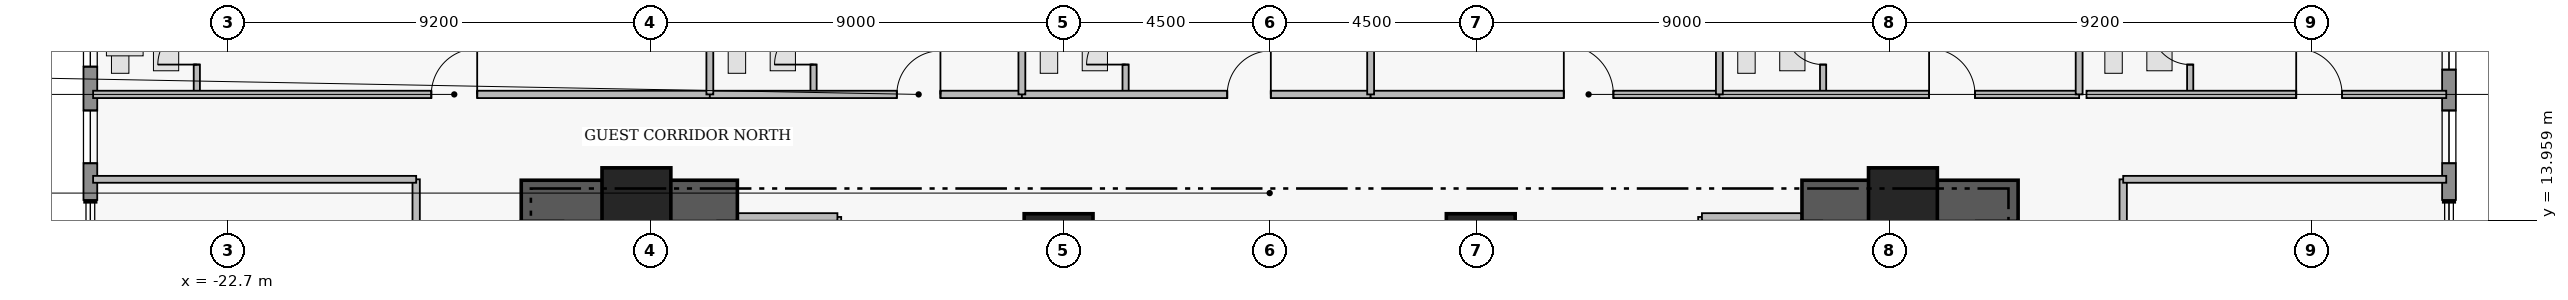
"""IFC4 building model, lengths in metres.
Left out: names, types, materials, properties, quantities, classifications, styles, units other than length and angle.
Written with IfcOpenShell. Run it as: python <this file> out.ifc"""

import sys

from ifc_helpers import new_model, si_unit, direction, frame, frame_2d, origin, origin_2d, place, context, subcontext, project, spatial, rectangle, extrude, element, fill, save


model = new_model("IFC4")
c1 = context("Model", 3, precision=1e-05, world=origin(), true_north=direction((0.0, 1.0)))
c2 = subcontext(c1, "Body", "Model", "MODEL_VIEW")
j1 = project(units=[si_unit("LENGTHUNIT", "METRE"), si_unit("PLANEANGLEUNIT", "RADIAN")], contexts=[c1])
p1 = place(None, origin())
s1 = spatial("IfcSite", under=j1, at=p1, CompositionType="ELEMENT")
p2 = place(p1, origin())
s2 = spatial("IfcBuilding", under=s1, at=p2, CompositionType="ELEMENT")
p3 = place(p2, frame((0.0, 0.0, 49.5)))
s3 = spatial("IfcBuildingStorey", under=s2, at=p3, CompositionType="ELEMENT", Elevation=49.5)
for number, where, z_axis, x_axis in (
    (1, (-16.31, 14.38, 0.0), (0.0, 0.0, 1.0), (1.0, 0.0, 0.0)),
    (2, (11.6, 14.38, 0.0), (0.0, 0.0, 1.0), (1.0, 0.0, 0.0)),
):
    element("IfcWall", number, at=place(p3, frame(where, z_axis=z_axis, x_axis=x_axis)), inside=s3, PredefinedType="SHEAR", context=c2, shape_type="SweptSolid", body=[
        extrude(rectangle(XDim=4.71, YDim=0.9, at=frame_2d((2.355, 0.0))), origin(), (0.0, 0.0, 1.0), 3.46),
    ])
for number, where, z_axis, x_axis in (
    (3, (-13.8, 14.35, 0.0), (0.0, 0.0, 1.0), (1.0, 0.0, 0.0)),
    (4, (-4.6, 13.35, 0.0), (0.0, 0.0, 1.0), (1.0, 0.0, 0.0)),
    (5, (4.6, 13.35, 0.0), (0.0, 0.0, 1.0), (1.0, 0.0, 0.0)),
    (6, (13.8, 14.35, 0.0), (0.0, 0.0, 1.0), (1.0, 0.0, 0.0)),
):
    element("IfcColumn", number, at=place(p3, frame(where, z_axis=z_axis, x_axis=x_axis)), inside=s3, PredefinedType="COLUMN", context=c2, shape_type="SweptSolid", body=[
        extrude(rectangle(XDim=1.5, YDim=1.5, at=origin_2d()), origin(), (0.0, 0.0, 1.0), 3.65),
    ])
p4 = place(p3, frame((-25.7, 14.4, 0.0), z_axis=(0.0, 0.0, 1.0), x_axis=(0.0, 1.0, 0.0)))
e7 = element("IfcWall", 7, at=p4, inside=s3, PredefinedType="STANDARD", context=c2, shape_type="SweptSolid", body=[
    extrude(rectangle(XDim=5.1, YDim=0.3, at=frame_2d((2.55, 0.0))), origin(), (0.0, 0.0, 1.0), 3.43),
])
p5 = place(p4, frame((0.8, 0.0, 0.95)))
e8 = element("IfcOpeningElement", 8, at=p5, cuts=e7, PredefinedType="OPENING", context=c2, shape_type="SweptSolid", body=[
    extrude(rectangle(XDim=1.15, YDim=1.55, at=frame_2d((0.575, 0.775))), frame((0.0, 0.16, 0.0), z_axis=(0.0, -1.0, 0.0), x_axis=(1.0, 0.0, 0.0)), (0.0, 0.0, 1.0), 0.32),
])
p6 = place(p4, frame((2.905, 0.0, 0.95)))
e9 = element("IfcOpeningElement", 9, at=p6, cuts=e7, PredefinedType="OPENING", context=c2, shape_type="SweptSolid", body=[
    extrude(rectangle(XDim=1.15, YDim=1.55, at=frame_2d((0.575, 0.775))), frame((0.0, 0.16, 0.0), z_axis=(0.0, -1.0, 0.0), x_axis=(1.0, 0.0, 0.0)), (0.0, 0.0, 1.0), 0.32),
])
p7 = place(p3, frame((25.7, 19.5, 0.0), z_axis=(0.0, 0.0, 1.0), x_axis=(0.0, -1.0, 0.0)))
e10 = element("IfcWall", 10, at=p7, inside=s3, PredefinedType="STANDARD", context=c2, shape_type="SweptSolid", body=[
    extrude(rectangle(XDim=5.1, YDim=0.3, at=frame_2d((2.55, 0.0))), origin(), (0.0, 0.0, 1.0), 3.43),
])
p8 = place(p7, frame((0.66, 0.0, 0.85)))
e11 = element("IfcOpeningElement", 11, at=p8, cuts=e10, PredefinedType="OPENING", context=c2, shape_type="SweptSolid", body=[
    extrude(rectangle(XDim=1.6, YDim=1.8, at=frame_2d((0.8, 0.9))), frame((0.0, 0.16, 0.0), z_axis=(0.0, -1.0, 0.0), x_axis=(1.0, 0.0, 0.0)), (0.0, 0.0, 1.0), 0.32),
])
p9 = place(p7, frame((3.15, 0.0, 0.95)))
e12 = element("IfcOpeningElement", 12, at=p9, cuts=e10, PredefinedType="OPENING", context=c2, shape_type="SweptSolid", body=[
    extrude(rectangle(XDim=1.15, YDim=1.55, at=frame_2d((0.575, 0.775))), frame((0.0, 0.16, 0.0), z_axis=(0.0, -1.0, 0.0), x_axis=(1.0, 0.0, 0.0)), (0.0, 0.0, 1.0), 0.32),
])
p10 = place(p3, frame((-23.38, 16.7, 0.0), z_axis=(0.0, 0.0, 1.0), x_axis=(0.0, 1.0, 0.0)))
e13 = element("IfcWall", 13, at=p10, inside=s3, PredefinedType="PLUMBINGWALL", context=c2, shape_type="SweptSolid", body=[
    extrude(rectangle(XDim=2.36, YDim=0.135, at=frame_2d((1.18, 0.0))), origin(), (0.0, 0.0, 1.0), 3.43),
])
p11 = place(p10, frame((0.65, 0.0, 0.0)))
e14 = element("IfcOpeningElement", 14, at=p11, cuts=e13, PredefinedType="OPENING", context=c2, shape_type="SweptSolid", body=[
    extrude(rectangle(XDim=0.85, YDim=2.1, at=frame_2d((0.425, 1.05))), frame((0.0, 0.077, 0.0), z_axis=(0.0, -1.0, 0.0), x_axis=(1.0, 0.0, 0.0)), (0.0, 0.0, 1.0), 0.155),
])
p12 = place(p3, frame((-25.64, 16.7, 0.0), z_axis=(0.0, 0.0, 1.0), x_axis=(1.0, 0.0, 0.0)))
e15 = element("IfcWall", 15, at=p12, inside=s3, PredefinedType="PARTITIONING", context=c2, shape_type="SweptSolid", body=[
    extrude(rectangle(XDim=13.44, YDim=0.16, at=frame_2d((6.72, 0.0))), origin(), (0.0, 0.0, 1.0), 2.973),
])
p13 = place(p12, frame((7.37, 0.0, 0.0)))
e16 = element("IfcOpeningElement", 16, at=p13, cuts=e15, PredefinedType="OPENING", context=c2, shape_type="SweptSolid", body=[
    extrude(rectangle(XDim=1.0, YDim=2.15, at=frame_2d((0.5, 1.075))), frame((0.0, 0.09, 0.0), z_axis=(0.0, -1.0, 0.0), x_axis=(1.0, 0.0, 0.0)), (0.0, 0.0, 1.0), 0.18),
])
p14 = place(p3, frame((-9.94, 16.7, 0.0), z_axis=(0.0, 0.0, 1.0), x_axis=(0.0, 1.0, 0.0)))
e17 = element("IfcWall", 17, at=p14, inside=s3, PredefinedType="PLUMBINGWALL", context=c2, shape_type="SweptSolid", body=[
    extrude(rectangle(XDim=2.36, YDim=0.135, at=frame_2d((1.18, 0.0))), origin(), (0.0, 0.0, 1.0), 3.43),
])
p15 = place(p14, frame((0.65, 0.0, 0.0)))
e18 = element("IfcOpeningElement", 18, at=p15, cuts=e17, PredefinedType="OPENING", context=c2, shape_type="SweptSolid", body=[
    extrude(rectangle(XDim=0.85, YDim=2.1, at=frame_2d((0.425, 1.05))), frame((0.0, 0.077, 0.0), z_axis=(0.0, -1.0, 0.0), x_axis=(1.0, 0.0, 0.0)), (0.0, 0.0, 1.0), 0.155),
])
p16 = place(p3, frame((-12.2, 16.7, 0.0), z_axis=(0.0, 0.0, 1.0), x_axis=(1.0, 0.0, 0.0)))
e19 = element("IfcWall", 19, at=p16, inside=s3, PredefinedType="PARTITIONING", context=c2, shape_type="SweptSolid", body=[
    extrude(rectangle(XDim=6.8, YDim=0.16, at=frame_2d((3.4, 0.0))), origin(), (0.0, 0.0, 1.0), 2.973),
])
p17 = place(p16, frame((4.075, 0.0, 0.0)))
e20 = element("IfcOpeningElement", 20, at=p17, cuts=e19, PredefinedType="OPENING", context=c2, shape_type="SweptSolid", body=[
    extrude(rectangle(XDim=0.95, YDim=2.15, at=frame_2d((0.475, 1.075))), frame((0.0, 0.09, 0.0), z_axis=(0.0, -1.0, 0.0), x_axis=(1.0, 0.0, 0.0)), (0.0, 0.0, 1.0), 0.18),
])
p18 = place(p3, frame((-3.14, 16.7, 0.0), z_axis=(0.0, 0.0, 1.0), x_axis=(0.0, 1.0, 0.0)))
e21 = element("IfcWall", 21, at=p18, inside=s3, PredefinedType="PLUMBINGWALL", context=c2, shape_type="SweptSolid", body=[
    extrude(rectangle(XDim=2.36, YDim=0.135, at=frame_2d((1.18, 0.0))), origin(), (0.0, 0.0, 1.0), 3.43),
])
p19 = place(p18, frame((0.65, 0.0, 0.0)))
e22 = element("IfcOpeningElement", 22, at=p19, cuts=e21, PredefinedType="OPENING", context=c2, shape_type="SweptSolid", body=[
    extrude(rectangle(XDim=0.85, YDim=2.1, at=frame_2d((0.425, 1.05))), frame((0.0, 0.077, 0.0), z_axis=(0.0, -1.0, 0.0), x_axis=(1.0, 0.0, 0.0)), (0.0, 0.0, 1.0), 0.155),
])
p20 = place(p3, frame((-5.4, 16.7, 0.0), z_axis=(0.0, 0.0, 1.0), x_axis=(1.0, 0.0, 0.0)))
e23 = element("IfcWall", 23, at=p20, inside=s3, PredefinedType="PARTITIONING", context=c2, shape_type="SweptSolid", body=[
    extrude(rectangle(XDim=7.6, YDim=0.16, at=frame_2d((3.8, 0.0))), origin(), (0.0, 0.0, 1.0), 2.973),
])
p21 = place(p20, frame((4.475, 0.0, 0.0)))
e24 = element("IfcOpeningElement", 24, at=p21, cuts=e23, PredefinedType="OPENING", context=c2, shape_type="SweptSolid", body=[
    extrude(rectangle(XDim=0.95, YDim=2.15, at=frame_2d((0.475, 1.075))), frame((0.0, 0.09, 0.0), z_axis=(0.0, -1.0, 0.0), x_axis=(1.0, 0.0, 0.0)), (0.0, 0.0, 1.0), 0.18),
])
p22 = place(p3, frame((2.2, 16.7, 0.0), z_axis=(0.0, 0.0, 1.0), x_axis=(1.0, 0.0, 0.0)))
e25 = element("IfcWall", 25, at=p22, inside=s3, PredefinedType="PARTITIONING", context=c2, shape_type="SweptSolid", body=[
    extrude(rectangle(XDim=7.6, YDim=0.16, at=frame_2d((3.8, 0.0))), origin(), (0.0, 0.0, 1.0), 2.973),
])
p23 = place(p22, frame((4.21, 0.0, 0.0)))
e26 = element("IfcOpeningElement", 26, at=p23, cuts=e25, PredefinedType="OPENING", context=c2, shape_type="SweptSolid", body=[
    extrude(rectangle(XDim=1.08, YDim=2.18, at=frame_2d((0.54, 1.09))), frame((0.0, 0.09, 0.0), z_axis=(0.0, -1.0, 0.0), x_axis=(1.0, 0.0, 0.0)), (0.0, 0.0, 1.0), 0.18),
])
p24 = place(p3, frame((12.06, 16.7, 0.0), z_axis=(0.0, 0.0, 1.0), x_axis=(0.0, 1.0, 0.0)))
e27 = element("IfcWall", 27, at=p24, inside=s3, PredefinedType="PLUMBINGWALL", context=c2, shape_type="SweptSolid", body=[
    extrude(rectangle(XDim=2.36, YDim=0.135, at=frame_2d((1.18, 0.0))), origin(), (0.0, 0.0, 1.0), 3.43),
])
p25 = place(p24, frame((0.65, 0.0, 0.0)))
e28 = element("IfcOpeningElement", 28, at=p25, cuts=e27, PredefinedType="OPENING", context=c2, shape_type="SweptSolid", body=[
    extrude(rectangle(XDim=0.85, YDim=2.1, at=frame_2d((0.425, 1.05))), frame((0.0, 0.077, 0.0), z_axis=(0.0, -1.0, 0.0), x_axis=(1.0, 0.0, 0.0)), (0.0, 0.0, 1.0), 0.155),
])
p26 = place(p3, frame((9.8, 16.7, 0.0), z_axis=(0.0, 0.0, 1.0), x_axis=(1.0, 0.0, 0.0)))
e29 = element("IfcWall", 29, at=p26, inside=s3, PredefinedType="PARTITIONING", context=c2, shape_type="SweptSolid", body=[
    extrude(rectangle(XDim=7.84, YDim=0.16, at=frame_2d((3.92, 0.0))), origin(), (0.0, 0.0, 1.0), 2.973),
])
p27 = place(p26, frame((4.57, 0.0, 0.0)))
e30 = element("IfcOpeningElement", 30, at=p27, cuts=e29, PredefinedType="OPENING", context=c2, shape_type="SweptSolid", body=[
    extrude(rectangle(XDim=1.0, YDim=2.15, at=frame_2d((0.5, 1.075))), frame((0.0, 0.09, 0.0), z_axis=(0.0, -1.0, 0.0), x_axis=(1.0, 0.0, 0.0)), (0.0, 0.0, 1.0), 0.18),
])
p28 = place(p3, frame((20.06, 16.7, 0.0), z_axis=(0.0, 0.0, 1.0), x_axis=(0.0, 1.0, 0.0)))
e31 = element("IfcWall", 31, at=p28, inside=s3, PredefinedType="PLUMBINGWALL", context=c2, shape_type="SweptSolid", body=[
    extrude(rectangle(XDim=2.36, YDim=0.135, at=frame_2d((1.18, 0.0))), origin(), (0.0, 0.0, 1.0), 3.43),
])
p29 = place(p28, frame((0.65, 0.0, 0.0)))
e32 = element("IfcOpeningElement", 32, at=p29, cuts=e31, PredefinedType="OPENING", context=c2, shape_type="SweptSolid", body=[
    extrude(rectangle(XDim=0.85, YDim=2.1, at=frame_2d((0.425, 1.05))), frame((0.0, 0.077, 0.0), z_axis=(0.0, -1.0, 0.0), x_axis=(1.0, 0.0, 0.0)), (0.0, 0.0, 1.0), 0.155),
])
p30 = place(p3, frame((17.8, 16.7, 0.0), z_axis=(0.0, 0.0, 1.0), x_axis=(1.0, 0.0, 0.0)))
e33 = element("IfcWall", 33, at=p30, inside=s3, PredefinedType="PARTITIONING", context=c2, shape_type="SweptSolid", body=[
    extrude(rectangle(XDim=7.84, YDim=0.16, at=frame_2d((3.92, 0.0))), origin(), (0.0, 0.0, 1.0), 3.43),
])
p31 = place(p30, frame((4.57, 0.0, 0.0)))
e34 = element("IfcOpeningElement", 34, at=p31, cuts=e33, PredefinedType="OPENING", context=c2, shape_type="SweptSolid", body=[
    extrude(rectangle(XDim=1.0, YDim=2.15, at=frame_2d((0.5, 1.075))), frame((0.0, 0.09, 0.0), z_axis=(0.0, -1.0, 0.0), x_axis=(1.0, 0.0, 0.0)), (0.0, 0.0, 1.0), 0.18),
])
p32 = place(p3, frame((18.6, 7.96, 0.0), z_axis=(0.0, 0.0, 1.0), x_axis=(0.0, 1.0, 0.0)))
e35 = element("IfcWall", 35, at=p32, inside=s3, PredefinedType="PARTITIONING", context=c2, shape_type="SweptSolid", body=[
    extrude(rectangle(XDim=6.89, YDim=0.16, at=frame_2d((3.445, 0.0))), origin(), (0.0, 0.0, 1.0), 3.43),
])
p33 = place(p32, frame((2.985, 0.0, 0.0)))
e36 = element("IfcOpeningElement", 36, at=p33, cuts=e35, PredefinedType="OPENING", context=c2, shape_type="SweptSolid", body=[
    extrude(rectangle(XDim=0.92, YDim=2.12, at=frame_2d((0.46, 1.06))), frame((0.0, 0.09, 0.0), z_axis=(0.0, -1.0, 0.0), x_axis=(1.0, 0.0, 0.0)), (0.0, 0.0, 1.0), 0.18),
])
p34 = place(p3, frame((-18.6, 1.55, 0.0), z_axis=(0.0, 0.0, 1.0), x_axis=(0.0, 1.0, 0.0)))
e37 = element("IfcWall", 37, at=p34, inside=s3, PredefinedType="PARTITIONING", context=c2, shape_type="SweptSolid", body=[
    extrude(rectangle(XDim=13.3, YDim=0.16, at=frame_2d((6.65, 0.0))), origin(), (0.0, 0.0, 1.0), 3.43),
])
p35 = place(p34, frame((6.175, 0.0, 0.0)))
e38 = element("IfcOpeningElement", 38, at=p35, cuts=e37, PredefinedType="OPENING", context=c2, shape_type="SweptSolid", body=[
    extrude(rectangle(XDim=0.95, YDim=2.15, at=frame_2d((0.475, 1.075))), frame((0.0, 0.09, 0.0), z_axis=(0.0, -1.0, 0.0), x_axis=(1.0, 0.0, 0.0)), (0.0, 0.0, 1.0), 0.18),
])
p36 = place(p3, frame((-9.42, 11.07, 0.0), z_axis=(0.0, 0.0, 1.0), x_axis=(0.0, 1.0, 0.0)))
e39 = element("IfcWall", 39, at=p36, inside=s3, PredefinedType="PARTITIONING", context=c2, shape_type="SweptSolid", body=[
    extrude(rectangle(XDim=2.96, YDim=0.165, at=frame_2d((1.48, 0.0))), origin(), (0.0, 0.0, 1.0), 3.43),
])
p37 = place(p3, frame((-11.58, 14.03, 0.0), z_axis=(0.0, 0.0, 1.0), x_axis=(1.0, 0.0, 0.0)))
e40 = element("IfcWall", 40, at=p37, inside=s3, PredefinedType="PARTITIONING", context=c2, shape_type="SweptSolid", body=[
    extrude(rectangle(XDim=2.16, YDim=0.165, at=frame_2d((1.08, 0.0))), origin(), (0.0, 0.0, 1.0), 3.43),
])
p38 = place(p3, frame((9.42, 11.07, 0.0), z_axis=(0.0, 0.0, 1.0), x_axis=(0.0, 1.0, 0.0)))
e41 = element("IfcWall", 41, at=p38, inside=s3, PredefinedType="PARTITIONING", context=c2, shape_type="SweptSolid", body=[
    extrude(rectangle(XDim=2.96, YDim=0.165, at=frame_2d((1.48, 0.0))), origin(), (0.0, 0.0, 1.0), 3.43),
])
p39 = place(p3, frame((9.42, 14.03, 0.0), z_axis=(0.0, 0.0, 1.0), x_axis=(1.0, 0.0, 0.0)))
e42 = element("IfcWall", 42, at=p39, inside=s3, PredefinedType="PARTITIONING", context=c2, shape_type="SweptSolid", body=[
    extrude(rectangle(XDim=2.16, YDim=0.165, at=frame_2d((1.08, 0.0))), origin(), (0.0, 0.0, 1.0), 3.43),
])
for number, where, z_axis, x_axis in (
    (43, (-12.2, 16.7, 0.0), (0.0, 0.0, 1.0), (0.0, 1.0, 0.0)),
    (44, (-5.4, 16.7, 0.0), (0.0, 0.0, 1.0), (0.0, 1.0, 0.0)),
    (45, (2.2, 16.7, 0.0), (0.0, 0.0, 1.0), (0.0, 1.0, 0.0)),
):
    element("IfcWall", number, at=place(p3, frame(where, z_axis=z_axis, x_axis=x_axis)), inside=s3, PredefinedType="PARTITIONING", context=c2, shape_type="SweptSolid", body=[
        extrude(rectangle(XDim=6.32, YDim=0.15, at=frame_2d((3.16, 0.0))), origin(), (0.0, 0.0, 1.0), 3.43),
    ])
p40 = place(p3, frame((9.8, 16.7, 0.0), z_axis=(0.0, 0.0, 1.0), x_axis=(0.0, 1.0, 0.0)))
e46 = element("IfcWall", 46, at=p40, inside=s3, PredefinedType="PARTITIONING", context=c2, shape_type="SweptSolid", body=[
    extrude(rectangle(XDim=6.34, YDim=0.15, at=frame_2d((3.17, 0.0))), origin(), (0.0, 0.0, 1.0), 3.43),
])
p41 = place(p3, frame((17.64, 16.7, 0.0), z_axis=(0.0, 0.0, 1.0), x_axis=(0.0, 1.0, 0.0)))
e47 = element("IfcWall", 47, at=p41, inside=s3, PredefinedType="PARTITIONING", context=c2, shape_type="SweptSolid", body=[
    extrude(rectangle(XDim=6.32, YDim=0.15, at=frame_2d((3.16, 0.0))), origin(), (0.0, 0.0, 1.0), 3.43),
])
for number, where, z_axis, x_axis in (
    (48, (18.6, 14.85, 0.0), (0.0, 0.0, 1.0), (1.0, 0.0, 0.0)),
    (49, (-25.64, 14.85, 0.0), (0.0, 0.0, 1.0), (1.0, 0.0, 0.0)),
):
    element("IfcWall", number, at=place(p3, frame(where, z_axis=z_axis, x_axis=x_axis)), inside=s3, PredefinedType="PARTITIONING", context=c2, shape_type="SweptSolid", body=[
        extrude(rectangle(XDim=7.04, YDim=0.15, at=frame_2d((3.52, 0.0))), origin(), (0.0, 0.0, 1.0), 3.43),
    ])
p42 = place(p5, origin())
e50 = element("IfcWindow", 50, at=p42, inside=s3, PartitioningType="SINGLE_PANEL", PredefinedType="WINDOW", context=c2, shape_type="SweptSolid", body=[
    extrude(rectangle(XDim=1.15, YDim=1.55, at=frame_2d((0.575, 0.775))), frame((0.0, 0.03, 0.0), z_axis=(0.0, -1.0, 0.0), x_axis=(1.0, 0.0, 0.0)), (0.0, 0.0, 1.0), 0.06),
])
fill(e8, e50)
p43 = place(p6, origin())
e51 = element("IfcWindow", 51, at=p43, inside=s3, PartitioningType="SINGLE_PANEL", PredefinedType="WINDOW", context=c2, shape_type="SweptSolid", body=[
    extrude(rectangle(XDim=1.15, YDim=1.55, at=frame_2d((0.575, 0.775))), frame((0.0, 0.03, 0.0), z_axis=(0.0, -1.0, 0.0), x_axis=(1.0, 0.0, 0.0)), (0.0, 0.0, 1.0), 0.06),
])
fill(e9, e51)
p44 = place(p8, origin())
e52 = element("IfcWindow", 52, at=p44, inside=s3, PartitioningType="SINGLE_PANEL", PredefinedType="WINDOW", context=c2, shape_type="SweptSolid", body=[
    extrude(rectangle(XDim=1.6, YDim=1.8, at=frame_2d((0.8, 0.9))), frame((0.0, 0.03, 0.0), z_axis=(0.0, -1.0, 0.0), x_axis=(1.0, 0.0, 0.0)), (0.0, 0.0, 1.0), 0.06),
])
fill(e11, e52)
p45 = place(p9, origin())
e53 = element("IfcWindow", 53, at=p45, inside=s3, PartitioningType="SINGLE_PANEL", PredefinedType="WINDOW", context=c2, shape_type="SweptSolid", body=[
    extrude(rectangle(XDim=1.15, YDim=1.55, at=frame_2d((0.575, 0.775))), frame((0.0, 0.03, 0.0), z_axis=(0.0, -1.0, 0.0), x_axis=(1.0, 0.0, 0.0)), (0.0, 0.0, 1.0), 0.06),
])
fill(e12, e53)
p46 = place(p11, origin())
e54 = element("IfcDoor", 54, at=p46, inside=s3, OperationType="SINGLE_SWING_LEFT", PredefinedType="DOOR", context=c2, shape_type="SweptSolid", body=[
    extrude(rectangle(XDim=0.85, YDim=2.1, at=frame_2d((0.425, 1.05))), frame((0.0, 0.025, 0.0), z_axis=(0.0, -1.0, 0.0), x_axis=(1.0, 0.0, 0.0)), (0.0, 0.0, 1.0), 0.05),
])
fill(e14, e54)
p47 = place(p13, origin())
e55 = element("IfcDoor", 55, at=p47, inside=s3, OperationType="SINGLE_SWING_RIGHT", PredefinedType="DOOR", context=c2, shape_type="SweptSolid", body=[
    extrude(rectangle(XDim=1.0, YDim=2.15, at=frame_2d((0.5, 1.075))), frame((0.0, 0.025, 0.0), z_axis=(0.0, -1.0, 0.0), x_axis=(1.0, 0.0, 0.0)), (0.0, 0.0, 1.0), 0.05),
])
fill(e16, e55)
p48 = place(p15, origin())
e56 = element("IfcDoor", 56, at=p48, inside=s3, OperationType="SINGLE_SWING_LEFT", PredefinedType="DOOR", context=c2, shape_type="SweptSolid", body=[
    extrude(rectangle(XDim=0.85, YDim=2.1, at=frame_2d((0.425, 1.05))), frame((0.0, 0.025, 0.0), z_axis=(0.0, -1.0, 0.0), x_axis=(1.0, 0.0, 0.0)), (0.0, 0.0, 1.0), 0.05),
])
fill(e18, e56)
p49 = place(p17, origin())
e57 = element("IfcDoor", 57, at=p49, inside=s3, OperationType="SINGLE_SWING_RIGHT", PredefinedType="DOOR", context=c2, shape_type="SweptSolid", body=[
    extrude(rectangle(XDim=0.95, YDim=2.15, at=frame_2d((0.475, 1.075))), frame((0.0, 0.025, 0.0), z_axis=(0.0, -1.0, 0.0), x_axis=(1.0, 0.0, 0.0)), (0.0, 0.0, 1.0), 0.05),
])
fill(e20, e57)
p50 = place(p19, origin())
e58 = element("IfcDoor", 58, at=p50, inside=s3, OperationType="SINGLE_SWING_LEFT", PredefinedType="DOOR", context=c2, shape_type="SweptSolid", body=[
    extrude(rectangle(XDim=0.85, YDim=2.1, at=frame_2d((0.425, 1.05))), frame((0.0, 0.025, 0.0), z_axis=(0.0, -1.0, 0.0), x_axis=(1.0, 0.0, 0.0)), (0.0, 0.0, 1.0), 0.05),
])
fill(e22, e58)
p51 = place(p21, origin())
e59 = element("IfcDoor", 59, at=p51, inside=s3, OperationType="SINGLE_SWING_RIGHT", PredefinedType="DOOR", context=c2, shape_type="SweptSolid", body=[
    extrude(rectangle(XDim=0.95, YDim=2.15, at=frame_2d((0.475, 1.075))), frame((0.0, 0.025, 0.0), z_axis=(0.0, -1.0, 0.0), x_axis=(1.0, 0.0, 0.0)), (0.0, 0.0, 1.0), 0.05),
])
fill(e24, e59)
p52 = place(p23, origin())
e60 = element("IfcDoor", 60, at=p52, inside=s3, OperationType="SINGLE_SWING_LEFT", PredefinedType="DOOR", context=c2, shape_type="SweptSolid", body=[
    extrude(rectangle(XDim=1.08, YDim=2.18, at=frame_2d((0.54, 1.09))), frame((0.0, 0.025, 0.0), z_axis=(0.0, -1.0, 0.0), x_axis=(1.0, 0.0, 0.0)), (0.0, 0.0, 1.0), 0.05),
])
fill(e26, e60)
p53 = place(p25, origin())
e61 = element("IfcDoor", 61, at=p53, inside=s3, OperationType="SINGLE_SWING_RIGHT", PredefinedType="DOOR", context=c2, shape_type="SweptSolid", body=[
    extrude(rectangle(XDim=0.85, YDim=2.1, at=frame_2d((0.425, 1.05))), frame((0.0, 0.025, 0.0), z_axis=(0.0, -1.0, 0.0), x_axis=(1.0, 0.0, 0.0)), (0.0, 0.0, 1.0), 0.05),
])
fill(e28, e61)
p54 = place(p27, origin())
e62 = element("IfcDoor", 62, at=p54, inside=s3, OperationType="SINGLE_SWING_LEFT", PredefinedType="DOOR", context=c2, shape_type="SweptSolid", body=[
    extrude(rectangle(XDim=1.0, YDim=2.15, at=frame_2d((0.5, 1.075))), frame((0.0, 0.025, 0.0), z_axis=(0.0, -1.0, 0.0), x_axis=(1.0, 0.0, 0.0)), (0.0, 0.0, 1.0), 0.05),
])
fill(e30, e62)
p55 = place(p29, origin())
e63 = element("IfcDoor", 63, at=p55, inside=s3, OperationType="SINGLE_SWING_RIGHT", PredefinedType="DOOR", context=c2, shape_type="SweptSolid", body=[
    extrude(rectangle(XDim=0.85, YDim=2.1, at=frame_2d((0.425, 1.05))), frame((0.0, 0.025, 0.0), z_axis=(0.0, -1.0, 0.0), x_axis=(1.0, 0.0, 0.0)), (0.0, 0.0, 1.0), 0.05),
])
fill(e32, e63)
p56 = place(p31, origin())
e64 = element("IfcDoor", 64, at=p56, inside=s3, OperationType="SINGLE_SWING_LEFT", PredefinedType="DOOR", context=c2, shape_type="SweptSolid", body=[
    extrude(rectangle(XDim=1.0, YDim=2.15, at=frame_2d((0.5, 1.075))), frame((0.0, 0.025, 0.0), z_axis=(0.0, -1.0, 0.0), x_axis=(1.0, 0.0, 0.0)), (0.0, 0.0, 1.0), 0.05),
])
fill(e34, e64)
save(model, sys.argv[1])
